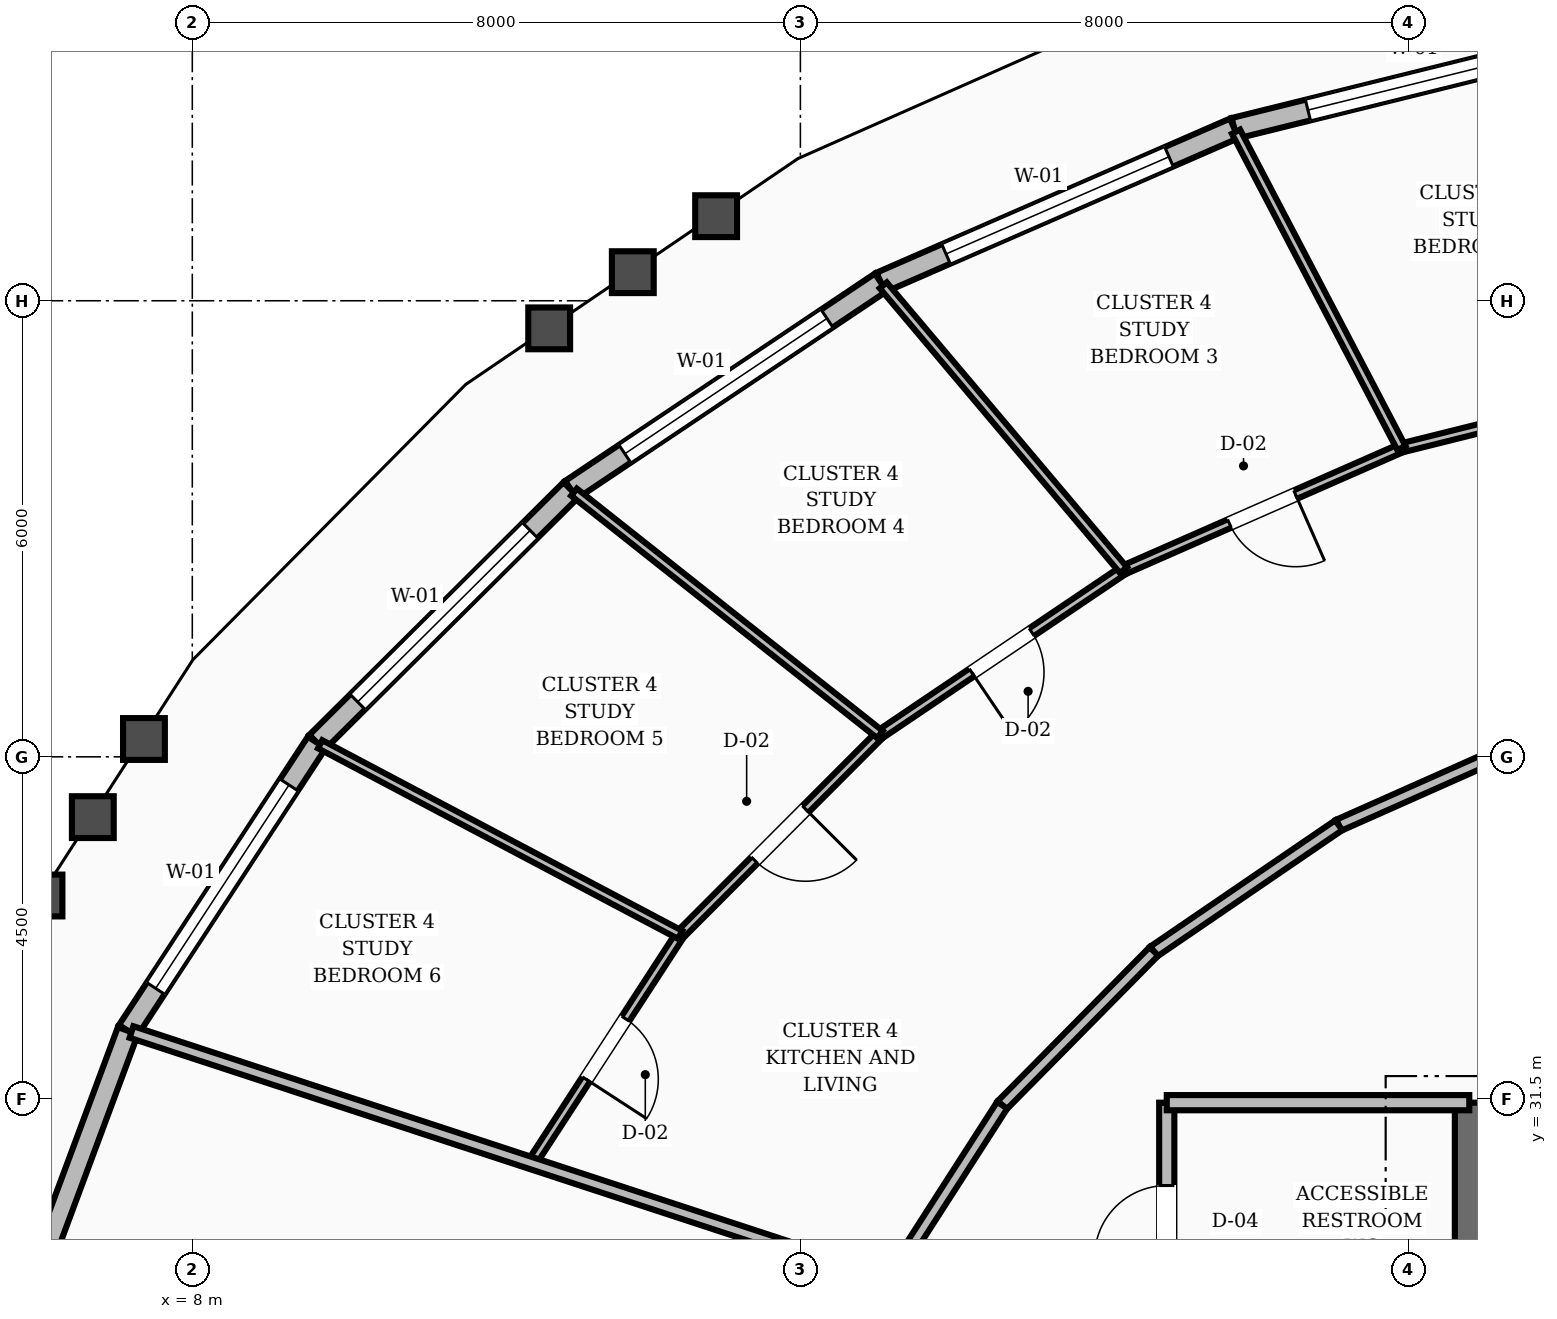
"""IFC4 building model, lengths in metres.
Left out: names, types, materials, properties, quantities, classifications, styles, units other than length and angle.
Written with IfcOpenShell. Run it as: python <this file> out.ifc"""

import sys

from ifc_helpers import new_model, si_unit, direction, frame, frame_2d, origin, place, context, subcontext, project, spatial, rectangle, extrude, element, fill, save


model = new_model("IFC4")
c1 = context("Model", 3, precision=1e-05, world=origin(), true_north=direction((0.0, 1.0)))
c2 = subcontext(c1, "Body", "Model", "MODEL_VIEW")
j1 = project(units=[si_unit("LENGTHUNIT", "METRE"), si_unit("PLANEANGLEUNIT", "RADIAN")], contexts=[c1])
p1 = place(None, origin())
s1 = spatial("IfcSite", under=j1, at=p1, CompositionType="ELEMENT")
p2 = place(p1, origin())
s2 = spatial("IfcBuilding", under=s1, at=p2, CompositionType="ELEMENT")
p3 = place(p2, frame((0.0, 0.0, 98.8)))
s3 = spatial("IfcBuildingStorey", under=s2, at=p3, CompositionType="ELEMENT", Elevation=98.8)
p4 = place(p3, frame((24.8, 25.15, 0.0), z_axis=(0.0, 0.0, 1.0), x_axis=(0.0, 1.0, 0.0)))
e1 = element("IfcWall", 1, at=p4, inside=s3, PredefinedType="SHEAR", context=c2, shape_type="SweptSolid", body=[
    extrude(rectangle(XDim=6.3, YDim=0.38, at=frame_2d((3.15, 0.0))), origin(), (0.0, 0.0, 1.0), 3.6),
])
p5 = place(p3, frame((26.753, 45.517, 0.0), z_axis=(0.0, 0.0, 1.0), x_axis=(-0.970717253555, -0.240224923043, 0.0)))
e2 = element("IfcWall", 2, at=p5, inside=s3, PredefinedType="STANDARD", context=c2, shape_type="SweptSolid", body=[
    extrude(rectangle(XDim=5.197, YDim=0.28, at=frame_2d((2.599, 0.0))), origin(), (0.0, 0.0, 1.0), 2.71),
])
p6 = place(p5, frame((0.999, 0.0, 0.8)))
e3 = element("IfcOpeningElement", 3, at=p6, cuts=e2, PredefinedType="OPENING", context=c2, shape_type="SweptSolid", body=[
    extrude(rectangle(XDim=3.2, YDim=1.65, at=frame_2d((1.6, 0.825))), frame((0.0, 0.15, 0.0), z_axis=(0.0, -1.0, 0.0), x_axis=(1.0, 0.0, 0.0)), (0.0, 0.0, 1.0), 0.3),
])
p7 = place(p3, frame((21.708, 44.269, 0.0), z_axis=(0.0, 0.0, 1.0), x_axis=(-0.9166625106, -0.399662159405, 0.0)))
e4 = element("IfcWall", 4, at=p7, inside=s3, PredefinedType="STANDARD", context=c2, shape_type="SweptSolid", body=[
    extrude(rectangle(XDim=5.073, YDim=0.28, at=frame_2d((2.536, 0.0))), origin(), (0.0, 0.0, 1.0), 2.71),
])
p8 = place(p7, frame((0.936, 0.0, 0.8)))
e5 = element("IfcOpeningElement", 5, at=p8, cuts=e4, PredefinedType="OPENING", context=c2, shape_type="SweptSolid", body=[
    extrude(rectangle(XDim=3.2, YDim=1.65, at=frame_2d((1.6, 0.825))), frame((0.0, 0.15, 0.0), z_axis=(0.0, -1.0, 0.0), x_axis=(1.0, 0.0, 0.0)), (0.0, 0.0, 1.0), 0.3),
])
p9 = place(p3, frame((17.058, 42.241, 0.0), z_axis=(0.0, 0.0, 1.0), x_axis=(-0.83098422739, -0.556295976822, 0.0)))
e6 = element("IfcWall", 6, at=p9, inside=s3, PredefinedType="STANDARD", context=c2, shape_type="SweptSolid", body=[
    extrude(rectangle(XDim=4.904, YDim=0.28, at=frame_2d((2.452, 0.0))), origin(), (0.0, 0.0, 1.0), 2.71),
])
p10 = place(p9, frame((0.852, 0.0, 0.8)))
e7 = element("IfcOpeningElement", 7, at=p10, cuts=e6, PredefinedType="OPENING", context=c2, shape_type="SweptSolid", body=[
    extrude(rectangle(XDim=3.2, YDim=1.65, at=frame_2d((1.6, 0.825))), frame((0.0, 0.15, 0.0), z_axis=(0.0, -1.0, 0.0), x_axis=(1.0, 0.0, 0.0)), (0.0, 0.0, 1.0), 0.3),
])
p11 = place(p3, frame((12.982, 39.513, 0.0), z_axis=(0.0, 0.0, 1.0), x_axis=(-0.709251981277, -0.704955053216, 0.0)))
e8 = element("IfcWall", 8, at=p11, inside=s3, PredefinedType="STANDARD", context=c2, shape_type="SweptSolid", body=[
    extrude(rectangle(XDim=4.716, YDim=0.28, at=frame_2d((2.358, 0.0))), origin(), (0.0, 0.0, 1.0), 2.71),
])
p12 = place(p11, frame((0.758, 0.0, 0.8)))
e9 = element("IfcOpeningElement", 9, at=p12, cuts=e8, PredefinedType="OPENING", context=c2, shape_type="SweptSolid", body=[
    extrude(rectangle(XDim=3.2, YDim=1.65, at=frame_2d((1.6, 0.825))), frame((0.0, 0.15, 0.0), z_axis=(0.0, -1.0, 0.0), x_axis=(1.0, 0.0, 0.0)), (0.0, 0.0, 1.0), 0.3),
])
p13 = place(p3, frame((9.638, 36.188, 0.0), z_axis=(0.0, 0.0, 1.0), x_axis=(-0.548073017765, -0.836430491552, 0.0)))
e10 = element("IfcWall", 10, at=p13, inside=s3, PredefinedType="STANDARD", context=c2, shape_type="SweptSolid", body=[
    extrude(rectangle(XDim=4.535, YDim=0.28, at=frame_2d((2.267, 0.0))), origin(), (0.0, 0.0, 1.0), 2.71),
])
p14 = place(p13, frame((0.667, 0.0, 0.8)))
e11 = element("IfcOpeningElement", 11, at=p14, cuts=e10, PredefinedType="OPENING", context=c2, shape_type="SweptSolid", body=[
    extrude(rectangle(XDim=3.2, YDim=1.65, at=frame_2d((1.6, 0.825))), frame((0.0, 0.15, 0.0), z_axis=(0.0, -1.0, 0.0), x_axis=(1.0, 0.0, 0.0)), (0.0, 0.0, 1.0), 0.3),
])
p15 = place(p3, frame((7.152, 32.396, 0.0), z_axis=(0.0, 0.0, 1.0), x_axis=(-0.348569013741, -0.937283117665, 0.0)))
e12 = element("IfcWall", 12, at=p15, inside=s3, PredefinedType="STANDARD", context=c2, shape_type="SweptSolid", body=[
    extrude(rectangle(XDim=4.391, YDim=0.28, at=frame_2d((2.195, 0.0))), origin(), (0.0, 0.0, 1.0), 2.71),
])
p16 = place(p3, frame((20.82, 28.32, 0.0), z_axis=(0.0, 0.0, 1.0), x_axis=(0.0, 1.0, 0.0)))
e13 = element("IfcWall", 13, at=p16, inside=s3, PredefinedType="SOLIDWALL", context=c2, shape_type="SweptSolid", body=[
    extrude(rectangle(XDim=3.13, YDim=0.2, at=frame_2d((1.565, 0.0))), origin(), (0.0, 0.0, 1.0), 2.71),
])
p17 = place(p16, frame((1.09, 0.0, 0.0)))
e14 = element("IfcOpeningElement", 14, at=p17, cuts=e13, PredefinedType="OPENING", context=c2, shape_type="SweptSolid", body=[
    extrude(rectangle(XDim=0.95, YDim=2.1, at=frame_2d((0.475, 1.05))), frame((0.0, 0.11, 0.0), z_axis=(0.0, -1.0, 0.0), x_axis=(1.0, 0.0, 0.0)), (0.0, 0.0, 1.0), 0.22),
])
p18 = place(p3, frame((20.82, 31.45, 0.0), z_axis=(0.0, 0.0, 1.0), x_axis=(1.0, 0.0, 0.0)))
e15 = element("IfcWall", 15, at=p18, inside=s3, PredefinedType="SOLIDWALL", context=c2, shape_type="SweptSolid", body=[
    extrude(rectangle(XDim=3.98, YDim=0.2, at=frame_2d((1.99, 0.0))), origin(), (0.0, 0.0, 1.0), 2.71),
])
p19 = place(p3, frame((25.858, 36.334, 0.0), z_axis=(0.0, 0.0, 1.0), x_axis=(-0.913768445178, -0.406235434936, 0.0)))
e16 = element("IfcWall", 16, at=p19, inside=s3, PredefinedType="SOLIDWALL", context=c2, shape_type="SweptSolid", body=[
    extrude(rectangle(XDim=3.037, YDim=0.16, at=frame_2d((1.519, 0.0))), origin(), (0.0, 0.0, 1.0), 2.71),
])
p20 = place(p3, frame((23.083, 35.1, 0.0), z_axis=(0.0, 0.0, 1.0), x_axis=(-0.825929039072, -0.563774088104, 0.0)))
e17 = element("IfcWall", 17, at=p20, inside=s3, PredefinedType="SOLIDWALL", context=c2, shape_type="SweptSolid", body=[
    extrude(rectangle(XDim=2.945, YDim=0.16, at=frame_2d((1.472, 0.0))), origin(), (0.0, 0.0, 1.0), 2.71),
])
p21 = place(p3, frame((20.651, 33.44, 0.0), z_axis=(0.0, 0.0, 1.0), x_axis=(-0.702366174226, -0.711815816981, 0.0)))
e18 = element("IfcWall", 18, at=p21, inside=s3, PredefinedType="SOLIDWALL", context=c2, shape_type="SweptSolid", body=[
    extrude(rectangle(XDim=2.842, YDim=0.16, at=frame_2d((1.421, 0.0))), origin(), (0.0, 0.0, 1.0), 2.71),
])
p22 = place(p3, frame((18.655, 31.417, 0.0), z_axis=(0.0, 0.0, 1.0), x_axis=(-0.540595670038, -0.841282545603, 0.0)))
e19 = element("IfcWall", 19, at=p22, inside=s3, PredefinedType="SOLIDWALL", context=c2, shape_type="SweptSolid", body=[
    extrude(rectangle(XDim=2.744, YDim=0.16, at=frame_2d((1.372, 0.0))), origin(), (0.0, 0.0, 1.0), 2.71),
])
p23 = place(p3, frame((27.875, 41.052, 0.0), z_axis=(0.0, 0.0, 1.0), x_axis=(-0.970275821055, -0.242001717092, 0.0)))
e20 = element("IfcWall", 20, at=p23, inside=s3, PredefinedType="PARTITIONING", context=c2, shape_type="SweptSolid", body=[
    extrude(rectangle(XDim=4.089, YDim=0.12, at=frame_2d((2.044, 0.0))), origin(), (0.0, 0.0, 1.0), 2.71),
])
p24 = place(p23, frame((1.569, 0.0, 0.0)))
e21 = element("IfcOpeningElement", 21, at=p24, cuts=e20, PredefinedType="OPENING", context=c2, shape_type="SweptSolid", body=[
    extrude(rectangle(XDim=0.95, YDim=2.1, at=frame_2d((0.475, 1.05))), frame((0.0, 0.07, 0.0), z_axis=(0.0, -1.0, 0.0), x_axis=(1.0, 0.0, 0.0)), (0.0, 0.0, 1.0), 0.14),
])
p25 = place(p3, frame((23.907, 40.063, 0.0), z_axis=(0.0, 0.0, 1.0), x_axis=(-0.915495231318, -0.402328822524, 0.0)))
e22 = element("IfcWall", 22, at=p25, inside=s3, PredefinedType="PARTITIONING", context=c2, shape_type="SweptSolid", body=[
    extrude(rectangle(XDim=3.993, YDim=0.12, at=frame_2d((1.997, 0.0))), origin(), (0.0, 0.0, 1.0), 2.71),
])
p26 = place(p25, frame((1.522, 0.0, 0.0)))
e23 = element("IfcOpeningElement", 23, at=p26, cuts=e22, PredefinedType="OPENING", context=c2, shape_type="SweptSolid", body=[
    extrude(rectangle(XDim=0.95, YDim=2.1, at=frame_2d((0.475, 1.05))), frame((0.0, 0.07, 0.0), z_axis=(0.0, -1.0, 0.0), x_axis=(1.0, 0.0, 0.0)), (0.0, 0.0, 1.0), 0.14),
])
p27 = place(p3, frame((23.907, 40.063, 0.0), z_axis=(0.0, 0.0, 1.0), x_axis=(-0.463443515986, 0.886126462471, 0.0)))
e24 = element("IfcWall", 24, at=p27, inside=s3, PredefinedType="PARTITIONING", context=c2, shape_type="SweptSolid", body=[
    extrude(rectangle(XDim=4.696, YDim=0.12, at=frame_2d((2.348, 0.0))), origin(), (0.0, 0.0, 1.0), 2.71),
])
p28 = place(p3, frame((20.251, 38.456, 0.0), z_axis=(0.0, 0.0, 1.0), x_axis=(-0.828967263528, -0.559297126757, 0.0)))
e25 = element("IfcWall", 25, at=p28, inside=s3, PredefinedType="PARTITIONING", context=c2, shape_type="SweptSolid", body=[
    extrude(rectangle(XDim=3.866, YDim=0.12, at=frame_2d((1.933, 0.0))), origin(), (0.0, 0.0, 1.0), 2.71),
])
p29 = place(p28, frame((1.458, 0.0, 0.0)))
e26 = element("IfcOpeningElement", 26, at=p29, cuts=e25, PredefinedType="OPENING", context=c2, shape_type="SweptSolid", body=[
    extrude(rectangle(XDim=0.95, YDim=2.1, at=frame_2d((0.475, 1.05))), frame((0.0, 0.07, 0.0), z_axis=(0.0, -1.0, 0.0), x_axis=(1.0, 0.0, 0.0)), (0.0, 0.0, 1.0), 0.14),
])
p30 = place(p3, frame((20.251, 38.456, 0.0), z_axis=(0.0, 0.0, 1.0), x_axis=(-0.644865484306, 0.764296086049, 0.0)))
e27 = element("IfcWall", 27, at=p30, inside=s3, PredefinedType="PARTITIONING", context=c2, shape_type="SweptSolid", body=[
    extrude(rectangle(XDim=4.902, YDim=0.12, at=frame_2d((2.451, 0.0))), origin(), (0.0, 0.0, 1.0), 2.71),
])
p31 = place(p3, frame((17.047, 36.294, 0.0), z_axis=(0.0, 0.0, 1.0), x_axis=(-0.706450655804, -0.707762298314, 0.0)))
e28 = element("IfcWall", 28, at=p31, inside=s3, PredefinedType="PARTITIONING", context=c2, shape_type="SweptSolid", body=[
    extrude(rectangle(XDim=3.723, YDim=0.12, at=frame_2d((1.861, 0.0))), origin(), (0.0, 0.0, 1.0), 2.71),
])
p32 = place(p31, frame((1.386, 0.0, 0.0)))
e29 = element("IfcOpeningElement", 29, at=p32, cuts=e28, PredefinedType="OPENING", context=c2, shape_type="SweptSolid", body=[
    extrude(rectangle(XDim=0.95, YDim=2.1, at=frame_2d((0.475, 1.05))), frame((0.0, 0.07, 0.0), z_axis=(0.0, -1.0, 0.0), x_axis=(1.0, 0.0, 0.0)), (0.0, 0.0, 1.0), 0.14),
])
p33 = place(p3, frame((17.047, 36.294, 0.0), z_axis=(0.0, 0.0, 1.0), x_axis=(-0.783934932715, 0.620842992446, 0.0)))
e30 = element("IfcWall", 30, at=p33, inside=s3, PredefinedType="PARTITIONING", context=c2, shape_type="SweptSolid", body=[
    extrude(rectangle(XDim=5.135, YDim=0.12, at=frame_2d((2.567, 0.0))), origin(), (0.0, 0.0, 1.0), 2.71),
])
p34 = place(p3, frame((14.417, 33.659, 0.0), z_axis=(0.0, 0.0, 1.0), x_axis=(-0.545045794667, -0.838406274855, 0.0)))
e31 = element("IfcWall", 31, at=p34, inside=s3, PredefinedType="PARTITIONING", context=c2, shape_type="SweptSolid", body=[
    extrude(rectangle(XDim=3.585, YDim=0.12, at=frame_2d((1.792, 0.0))), origin(), (0.0, 0.0, 1.0), 2.71),
])
p35 = place(p34, frame((1.318, 0.0, 0.0)))
e32 = element("IfcOpeningElement", 32, at=p35, cuts=e31, PredefinedType="OPENING", context=c2, shape_type="SweptSolid", body=[
    extrude(rectangle(XDim=0.95, YDim=2.1, at=frame_2d((0.475, 1.05))), frame((0.0, 0.07, 0.0), z_axis=(0.0, -1.0, 0.0), x_axis=(1.0, 0.0, 0.0)), (0.0, 0.0, 1.0), 0.14),
])
p36 = place(p3, frame((14.417, 33.659, 0.0), z_axis=(0.0, 0.0, 1.0), x_axis=(-0.883871044987, 0.467730665912, 0.0)))
e33 = element("IfcWall", 33, at=p36, inside=s3, PredefinedType="PARTITIONING", context=c2, shape_type="SweptSolid", body=[
    extrude(rectangle(XDim=5.357, YDim=0.12, at=frame_2d((2.678, 0.0))), origin(), (0.0, 0.0, 1.0), 2.71),
])
p37 = place(p3, frame((17.172, 29.109, 0.0), z_axis=(0.0, 0.0, 1.0), x_axis=(-0.950186855509, 0.311680829725, 0.0)))
e34 = element("IfcWall", 34, at=p37, inside=s3, PredefinedType="SOLIDWALL", context=c2, shape_type="SweptSolid", body=[
    extrude(rectangle(XDim=10.495, YDim=0.16, at=frame_2d((5.247, 0.0))), origin(), (0.0, 0.0, 1.0), 2.71),
])
p38 = place(p6, origin())
e35 = element("IfcWindow", 35, at=p38, inside=s3, PartitioningType="SINGLE_PANEL", PredefinedType="WINDOW", context=c2, shape_type="SweptSolid", body=[
    extrude(rectangle(XDim=3.2, YDim=1.65, at=frame_2d((1.6, 0.825))), frame((0.0, 0.03, 0.0), z_axis=(0.0, -1.0, 0.0), x_axis=(1.0, 0.0, 0.0)), (0.0, 0.0, 1.0), 0.06),
])
fill(e3, e35)
p39 = place(p8, origin())
e36 = element("IfcWindow", 36, at=p39, inside=s3, PartitioningType="SINGLE_PANEL", PredefinedType="WINDOW", context=c2, shape_type="SweptSolid", body=[
    extrude(rectangle(XDim=3.2, YDim=1.65, at=frame_2d((1.6, 0.825))), frame((0.0, 0.03, 0.0), z_axis=(0.0, -1.0, 0.0), x_axis=(1.0, 0.0, 0.0)), (0.0, 0.0, 1.0), 0.06),
])
fill(e5, e36)
p40 = place(p10, origin())
e37 = element("IfcWindow", 37, at=p40, inside=s3, PartitioningType="SINGLE_PANEL", PredefinedType="WINDOW", context=c2, shape_type="SweptSolid", body=[
    extrude(rectangle(XDim=3.2, YDim=1.65, at=frame_2d((1.6, 0.825))), frame((0.0, 0.03, 0.0), z_axis=(0.0, -1.0, 0.0), x_axis=(1.0, 0.0, 0.0)), (0.0, 0.0, 1.0), 0.06),
])
fill(e7, e37)
p41 = place(p12, origin())
e38 = element("IfcWindow", 38, at=p41, inside=s3, PartitioningType="SINGLE_PANEL", PredefinedType="WINDOW", context=c2, shape_type="SweptSolid", body=[
    extrude(rectangle(XDim=3.2, YDim=1.65, at=frame_2d((1.6, 0.825))), frame((0.0, 0.03, 0.0), z_axis=(0.0, -1.0, 0.0), x_axis=(1.0, 0.0, 0.0)), (0.0, 0.0, 1.0), 0.06),
])
fill(e9, e38)
p42 = place(p14, origin())
e39 = element("IfcWindow", 39, at=p42, inside=s3, PartitioningType="SINGLE_PANEL", PredefinedType="WINDOW", context=c2, shape_type="SweptSolid", body=[
    extrude(rectangle(XDim=3.2, YDim=1.65, at=frame_2d((1.6, 0.825))), frame((0.0, 0.03, 0.0), z_axis=(0.0, -1.0, 0.0), x_axis=(1.0, 0.0, 0.0)), (0.0, 0.0, 1.0), 0.06),
])
fill(e11, e39)
p43 = place(p17, origin())
e40 = element("IfcDoor", 40, at=p43, inside=s3, OperationType="SINGLE_SWING_LEFT", PredefinedType="DOOR", context=c2, shape_type="SweptSolid", body=[
    extrude(rectangle(XDim=0.95, YDim=2.1, at=frame_2d((0.475, 1.05))), frame((0.0, 0.025, 0.0), z_axis=(0.0, -1.0, 0.0), x_axis=(1.0, 0.0, 0.0)), (0.0, 0.0, 1.0), 0.05),
])
fill(e14, e40)
p44 = place(p26, origin())
e41 = element("IfcDoor", 41, at=p44, inside=s3, OperationType="SINGLE_SWING_LEFT", PredefinedType="DOOR", context=c2, shape_type="SweptSolid", body=[
    extrude(rectangle(XDim=0.95, YDim=2.1, at=frame_2d((0.475, 1.05))), frame((0.0, 0.025, 0.0), z_axis=(0.0, -1.0, 0.0), x_axis=(1.0, 0.0, 0.0)), (0.0, 0.0, 1.0), 0.05),
])
fill(e23, e41)
p45 = place(p29, origin())
e42 = element("IfcDoor", 42, at=p45, inside=s3, OperationType="SINGLE_SWING_RIGHT", PredefinedType="DOOR", context=c2, shape_type="SweptSolid", body=[
    extrude(rectangle(XDim=0.95, YDim=2.1, at=frame_2d((0.475, 1.05))), frame((0.0, 0.025, 0.0), z_axis=(0.0, -1.0, 0.0), x_axis=(1.0, 0.0, 0.0)), (0.0, 0.0, 1.0), 0.05),
])
fill(e26, e42)
p46 = place(p32, origin())
e43 = element("IfcDoor", 43, at=p46, inside=s3, OperationType="SINGLE_SWING_LEFT", PredefinedType="DOOR", context=c2, shape_type="SweptSolid", body=[
    extrude(rectangle(XDim=0.95, YDim=2.1, at=frame_2d((0.475, 1.05))), frame((0.0, 0.025, 0.0), z_axis=(0.0, -1.0, 0.0), x_axis=(1.0, 0.0, 0.0)), (0.0, 0.0, 1.0), 0.05),
])
fill(e29, e43)
p47 = place(p35, origin())
e44 = element("IfcDoor", 44, at=p47, inside=s3, OperationType="SINGLE_SWING_RIGHT", PredefinedType="DOOR", context=c2, shape_type="SweptSolid", body=[
    extrude(rectangle(XDim=0.95, YDim=2.1, at=frame_2d((0.475, 1.05))), frame((0.0, 0.025, 0.0), z_axis=(0.0, -1.0, 0.0), x_axis=(1.0, 0.0, 0.0)), (0.0, 0.0, 1.0), 0.05),
])
fill(e32, e44)
save(model, sys.argv[1])
